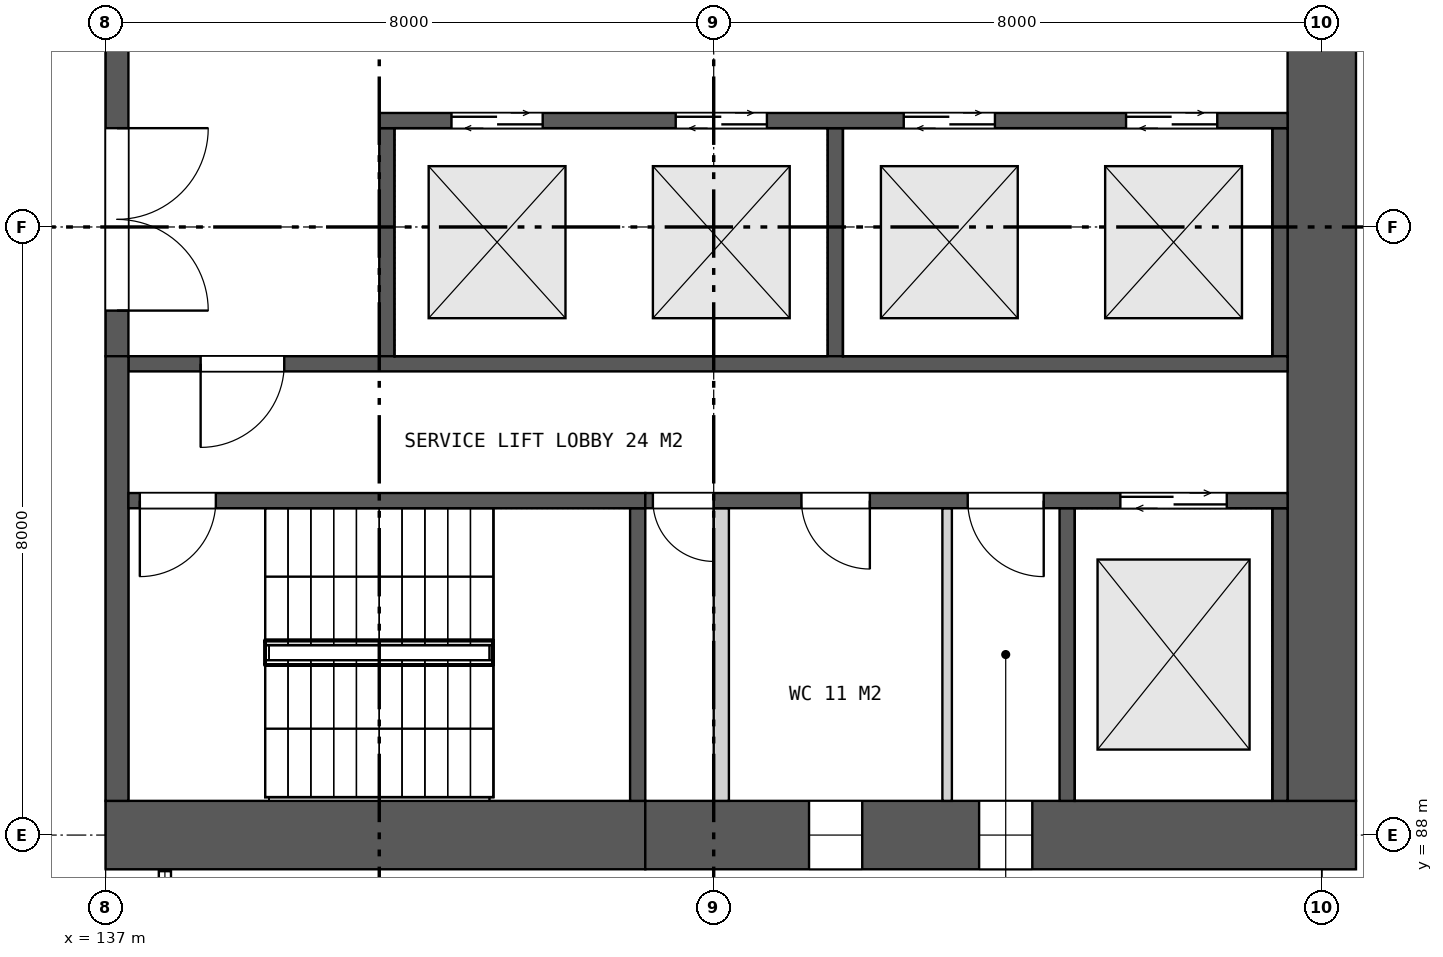
"""IFC4 building model, lengths in metres.
Left out: names, types, materials, properties, quantities, classifications, styles, units other than length and angle.
Written with IfcOpenShell. Run it as: python <this file> out.ifc"""

import sys

from ifc_helpers import new_model, si_unit, direction, frame, frame_2d, origin, place, context, subcontext, project, spatial, rectangle, extrude, element, fill, save


model = new_model("IFC4")
c1 = context("Model", 3, precision=1e-05, world=origin(), true_north=direction((0.0, 1.0)))
c2 = subcontext(c1, "Body", "Model", "MODEL_VIEW")
j1 = project(units=[si_unit("LENGTHUNIT", "METRE"), si_unit("PLANEANGLEUNIT", "RADIAN")], contexts=[c1])
p1 = place(None, origin())
s1 = spatial("IfcSite", under=j1, at=p1, CompositionType="ELEMENT")
p2 = place(p1, origin())
s2 = spatial("IfcBuilding", under=s1, at=p2, CompositionType="ELEMENT")
p3 = place(p2, frame((0.0, 0.0, 25.0)))
s3 = spatial("IfcBuildingStorey", under=s2, at=p3, CompositionType="ELEMENT", Elevation=25.0)
p4 = place(p3, frame((137.0, 88.0, 0.0), z_axis=(0.0, 0.0, 1.0), x_axis=(1.0, 0.0, 0.0)))
e1 = element("IfcWall", 1, at=p4, inside=s3, PredefinedType="SHEAR", context=c2, shape_type="SweptSolid", body=[
    extrude(rectangle(XDim=7.1, YDim=0.9, at=frame_2d((3.55, 0.0))), origin(), (0.0, 0.0, 1.0), 9.0),
])
p5 = place(p3, frame((144.1, 88.0, 0.0), z_axis=(0.0, 0.0, 1.0), x_axis=(1.0, 0.0, 0.0)))
e2 = element("IfcWall", 2, at=p5, inside=s3, PredefinedType="SHEAR", context=c2, shape_type="SweptSolid", body=[
    extrude(rectangle(XDim=9.35, YDim=0.9, at=frame_2d((4.675, 0.0))), origin(), (0.0, 0.0, 1.0), 9.0),
])
p6 = place(p5, frame((2.154, 0.0, 1.5)))
e3 = element("IfcOpeningElement", 3, at=p6, cuts=e2, PredefinedType="OPENING", context=c2, shape_type="SweptSolid", body=[
    extrude(rectangle(XDim=0.7, YDim=0.9, at=frame_2d((0.35, 0.45))), frame((0.0, 0.46, 0.0), z_axis=(0.0, -1.0, 0.0), x_axis=(1.0, 0.0, 0.0)), (0.0, 0.0, 1.0), 0.92),
])
p7 = place(p5, frame((4.392, 0.0, 1.5)))
e4 = element("IfcOpeningElement", 4, at=p7, cuts=e2, PredefinedType="OPENING", context=c2, shape_type="SweptSolid", body=[
    extrude(rectangle(XDim=0.7, YDim=0.9, at=frame_2d((0.35, 0.45))), frame((0.0, 0.46, 0.0), z_axis=(0.0, -1.0, 0.0), x_axis=(1.0, 0.0, 0.0)), (0.0, 0.0, 1.0), 0.92),
])
p8 = place(p3, frame((153.0, 88.45, 0.0), z_axis=(0.0, 0.0, 1.0), x_axis=(0.0, 1.0, 0.0)))
e5 = element("IfcWall", 5, at=p8, inside=s3, PredefinedType="SHEAR", context=c2, shape_type="SweptSolid", body=[
    extrude(rectangle(XDim=23.1, YDim=0.9, at=frame_2d((11.55, 0.0))), origin(), (0.0, 0.0, 1.0), 9.0),
])
p9 = place(p8, frame((10.35, 0.0, 0.0)))
e6 = element("IfcOpeningElement", 6, at=p9, cuts=e5, PredefinedType="OPENING", context=c2, shape_type="SweptSolid", body=[
    extrude(rectangle(XDim=2.4, YDim=2.4, at=frame_2d((1.2, 1.2))), frame((0.0, 0.46, 0.0), z_axis=(0.0, -1.0, 0.0), x_axis=(1.0, 0.0, 0.0)), (0.0, 0.0, 1.0), 0.92),
])
p10 = place(p3, frame((137.15, 94.3, 0.0), z_axis=(0.0, 0.0, 1.0), x_axis=(0.0, 1.0, 0.0)))
e7 = element("IfcWall", 7, at=p10, inside=s3, PredefinedType="SHEAR", context=c2, shape_type="SweptSolid", body=[
    extrude(rectangle(XDim=11.4, YDim=0.3, at=frame_2d((5.7, 0.0))), origin(), (0.0, 0.0, 1.0), 9.0),
])
p11 = place(p10, frame((0.6, 0.0, 0.0)))
e8 = element("IfcOpeningElement", 8, at=p11, cuts=e7, PredefinedType="OPENING", context=c2, shape_type="SweptSolid", body=[
    extrude(rectangle(XDim=2.4, YDim=2.4, at=frame_2d((1.2, 1.2))), frame((0.0, 0.16, 0.0), z_axis=(0.0, -1.0, 0.0), x_axis=(1.0, 0.0, 0.0)), (0.0, 0.0, 1.0), 0.32),
])
p12 = place(p10, frame((4.5, 0.0, 0.0)))
e9 = element("IfcOpeningElement", 9, at=p12, cuts=e7, PredefinedType="OPENING", context=c2, shape_type="SweptSolid", body=[
    extrude(rectangle(XDim=2.4, YDim=2.4, at=frame_2d((1.2, 1.2))), frame((0.0, 0.16, 0.0), z_axis=(0.0, -1.0, 0.0), x_axis=(1.0, 0.0, 0.0)), (0.0, 0.0, 1.0), 0.32),
])
p13 = place(p10, frame((8.4, 0.0, 0.0)))
e10 = element("IfcOpeningElement", 10, at=p13, cuts=e7, PredefinedType="OPENING", context=c2, shape_type="SweptSolid", body=[
    extrude(rectangle(XDim=2.4, YDim=2.4, at=frame_2d((1.2, 1.2))), frame((0.0, 0.16, 0.0), z_axis=(0.0, -1.0, 0.0), x_axis=(1.0, 0.0, 0.0)), (0.0, 0.0, 1.0), 0.32),
])
for number, where, z_axis, x_axis in (
    (11, (140.7, 94.3, 0.0), (0.0, 0.0, 1.0), (0.0, 1.0, 0.0)),
    (12, (146.6, 94.3, 0.0), (0.0, 0.0, 1.0), (0.0, 1.0, 0.0)),
    (13, (152.45, 94.3, 0.0), (0.0, 0.0, 1.0), (0.0, 1.0, 0.0)),
):
    element("IfcWall", number, at=place(p3, frame(where, z_axis=z_axis, x_axis=x_axis)), inside=s3, PredefinedType="SHEAR", context=c2, shape_type="SweptSolid", body=[
        extrude(rectangle(XDim=3.0, YDim=0.2, at=frame_2d((1.5, 0.0))), origin(), (0.0, 0.0, 1.0), 9.0),
    ])
p14 = place(p3, frame((140.6, 97.4, 0.0), z_axis=(0.0, 0.0, 1.0), x_axis=(1.0, 0.0, 0.0)))
e14 = element("IfcWall", 14, at=p14, inside=s3, PredefinedType="SHEAR", context=c2, shape_type="SweptSolid", body=[
    extrude(rectangle(XDim=11.95, YDim=0.2, at=frame_2d((5.975, 0.0))), origin(), (0.0, 0.0, 1.0), 9.0),
])
p15 = place(p14, frame((0.95, 0.0, 0.0)))
e15 = element("IfcOpeningElement", 15, at=p15, cuts=e14, PredefinedType="OPENING", context=c2, shape_type="SweptSolid", body=[
    extrude(rectangle(XDim=1.2, YDim=2.1, at=frame_2d((0.6, 1.05))), frame((0.0, 0.11, 0.0), z_axis=(0.0, -1.0, 0.0), x_axis=(1.0, 0.0, 0.0)), (0.0, 0.0, 1.0), 0.22),
])
p16 = place(p14, frame((3.9, 0.0, 0.0)))
e16 = element("IfcOpeningElement", 16, at=p16, cuts=e14, PredefinedType="OPENING", context=c2, shape_type="SweptSolid", body=[
    extrude(rectangle(XDim=1.2, YDim=2.1, at=frame_2d((0.6, 1.05))), frame((0.0, 0.11, 0.0), z_axis=(0.0, -1.0, 0.0), x_axis=(1.0, 0.0, 0.0)), (0.0, 0.0, 1.0), 0.22),
])
p17 = place(p14, frame((6.9, 0.0, 0.0)))
e17 = element("IfcOpeningElement", 17, at=p17, cuts=e14, PredefinedType="OPENING", context=c2, shape_type="SweptSolid", body=[
    extrude(rectangle(XDim=1.2, YDim=2.1, at=frame_2d((0.6, 1.05))), frame((0.0, 0.11, 0.0), z_axis=(0.0, -1.0, 0.0), x_axis=(1.0, 0.0, 0.0)), (0.0, 0.0, 1.0), 0.22),
])
p18 = place(p14, frame((9.825, 0.0, 0.0)))
e18 = element("IfcOpeningElement", 18, at=p18, cuts=e14, PredefinedType="OPENING", context=c2, shape_type="SweptSolid", body=[
    extrude(rectangle(XDim=1.2, YDim=2.1, at=frame_2d((0.6, 1.05))), frame((0.0, 0.11, 0.0), z_axis=(0.0, -1.0, 0.0), x_axis=(1.0, 0.0, 0.0)), (0.0, 0.0, 1.0), 0.22),
])
p19 = place(p3, frame((137.3, 94.2, 0.0), z_axis=(0.0, 0.0, 1.0), x_axis=(1.0, 0.0, 0.0)))
e19 = element("IfcWall", 19, at=p19, inside=s3, PredefinedType="SHEAR", context=c2, shape_type="SweptSolid", body=[
    extrude(rectangle(XDim=15.25, YDim=0.2, at=frame_2d((7.625, 0.0))), origin(), (0.0, 0.0, 1.0), 9.0),
])
p20 = place(p19, frame((0.95, 0.0, 0.0)))
e20 = element("IfcOpeningElement", 20, at=p20, cuts=e19, PredefinedType="OPENING", context=c2, shape_type="SweptSolid", body=[
    extrude(rectangle(XDim=1.1, YDim=2.1, at=frame_2d((0.55, 1.05))), frame((0.0, 0.11, 0.0), z_axis=(0.0, -1.0, 0.0), x_axis=(1.0, 0.0, 0.0)), (0.0, 0.0, 1.0), 0.22),
])
p21 = place(p3, frame((137.15, 88.45, 0.0), z_axis=(0.0, 0.0, 1.0), x_axis=(0.0, 1.0, 0.0)))
e21 = element("IfcWall", 21, at=p21, inside=s3, PredefinedType="SHEAR", context=c2, shape_type="SweptSolid", body=[
    extrude(rectangle(XDim=5.85, YDim=0.3, at=frame_2d((2.925, 0.0))), origin(), (0.0, 0.0, 1.0), 9.0),
])
for number, where, z_axis, x_axis in (
    (22, (144.0, 88.45, 0.0), (0.0, 0.0, 1.0), (0.0, 1.0, 0.0)),
    (23, (149.65, 88.45, 0.0), (0.0, 0.0, 1.0), (0.0, 1.0, 0.0)),
    (24, (152.45, 88.45, 0.0), (0.0, 0.0, 1.0), (0.0, 1.0, 0.0)),
):
    element("IfcWall", number, at=place(p3, frame(where, z_axis=z_axis, x_axis=x_axis)), inside=s3, PredefinedType="SHEAR", context=c2, shape_type="SweptSolid", body=[
        extrude(rectangle(XDim=3.85, YDim=0.2, at=frame_2d((1.925, 0.0))), origin(), (0.0, 0.0, 1.0), 9.0),
    ])
p22 = place(p3, frame((145.1, 88.45, 0.0), z_axis=(0.0, 0.0, 1.0), x_axis=(0.0, 1.0, 0.0)))
e25 = element("IfcWall", 25, at=p22, inside=s3, PredefinedType="PARTITIONING", context=c2, shape_type="SweptSolid", body=[
    extrude(rectangle(XDim=3.85, YDim=0.2, at=frame_2d((1.925, 0.0))), origin(), (0.0, 0.0, 1.0), 9.0),
])
p23 = place(p3, frame((148.071, 88.45, 0.0), z_axis=(0.0, 0.0, 1.0), x_axis=(0.0, 1.0, 0.0)))
e26 = element("IfcWall", 26, at=p23, inside=s3, PredefinedType="PARTITIONING", context=c2, shape_type="SweptSolid", body=[
    extrude(rectangle(XDim=3.85, YDim=0.125, at=frame_2d((1.925, 0.0))), origin(), (0.0, 0.0, 1.0), 9.0),
])
p24 = place(p3, frame((137.3, 92.4, 0.0), z_axis=(0.0, 0.0, 1.0), x_axis=(1.0, 0.0, 0.0)))
e27 = element("IfcWall", 27, at=p24, inside=s3, PredefinedType="SHEAR", context=c2, shape_type="SweptSolid", body=[
    extrude(rectangle(XDim=6.8, YDim=0.2, at=frame_2d((3.4, 0.0))), origin(), (0.0, 0.0, 1.0), 9.0),
])
p25 = place(p24, frame((0.15, 0.0, 0.0)))
e28 = element("IfcOpeningElement", 28, at=p25, cuts=e27, PredefinedType="OPENING", context=c2, shape_type="SweptSolid", body=[
    extrude(rectangle(XDim=1.0, YDim=2.1, at=frame_2d((0.5, 1.05))), frame((0.0, 0.11, 0.0), z_axis=(0.0, -1.0, 0.0), x_axis=(1.0, 0.0, 0.0)), (0.0, 0.0, 1.0), 0.22),
])
p26 = place(p3, frame((144.1, 92.4, 0.0), z_axis=(0.0, 0.0, 1.0), x_axis=(1.0, 0.0, 0.0)))
e29 = element("IfcWall", 29, at=p26, inside=s3, PredefinedType="SHEAR", context=c2, shape_type="SweptSolid", body=[
    extrude(rectangle(XDim=8.45, YDim=0.2, at=frame_2d((4.225, 0.0))), origin(), (0.0, 0.0, 1.0), 9.0),
])
p27 = place(p26, frame((0.1, 0.0, 0.0)))
e30 = element("IfcOpeningElement", 30, at=p27, cuts=e29, PredefinedType="OPENING", context=c2, shape_type="SweptSolid", body=[
    extrude(rectangle(XDim=0.8, YDim=2.1, at=frame_2d((0.4, 1.05))), frame((0.0, 0.11, 0.0), z_axis=(0.0, -1.0, 0.0), x_axis=(1.0, 0.0, 0.0)), (0.0, 0.0, 1.0), 0.22),
])
p28 = place(p26, frame((2.054, 0.0, 0.0)))
e31 = element("IfcOpeningElement", 31, at=p28, cuts=e29, PredefinedType="OPENING", context=c2, shape_type="SweptSolid", body=[
    extrude(rectangle(XDim=0.9, YDim=2.1, at=frame_2d((0.45, 1.05))), frame((0.0, 0.11, 0.0), z_axis=(0.0, -1.0, 0.0), x_axis=(1.0, 0.0, 0.0)), (0.0, 0.0, 1.0), 0.22),
])
p29 = place(p26, frame((4.242, 0.0, 0.0)))
e32 = element("IfcOpeningElement", 32, at=p29, cuts=e29, PredefinedType="OPENING", context=c2, shape_type="SweptSolid", body=[
    extrude(rectangle(XDim=1.0, YDim=2.1, at=frame_2d((0.5, 1.05))), frame((0.0, 0.11, 0.0), z_axis=(0.0, -1.0, 0.0), x_axis=(1.0, 0.0, 0.0)), (0.0, 0.0, 1.0), 0.22),
])
p30 = place(p26, frame((6.25, 0.0, 0.0)))
e33 = element("IfcOpeningElement", 33, at=p30, cuts=e29, PredefinedType="OPENING", context=c2, shape_type="SweptSolid", body=[
    extrude(rectangle(XDim=1.4, YDim=2.1, at=frame_2d((0.7, 1.05))), frame((0.0, 0.11, 0.0), z_axis=(0.0, -1.0, 0.0), x_axis=(1.0, 0.0, 0.0)), (0.0, 0.0, 1.0), 0.22),
])
p31 = place(p6, origin())
e34 = element("IfcWindow", 34, at=p31, inside=s3, PartitioningType="SINGLE_PANEL", PredefinedType="WINDOW", context=c2, shape_type="SweptSolid", body=[
    extrude(rectangle(XDim=0.7, YDim=0.9, at=frame_2d((0.35, 0.45))), frame((0.0, 0.03, 0.0), z_axis=(0.0, -1.0, 0.0), x_axis=(1.0, 0.0, 0.0)), (0.0, 0.0, 1.0), 0.06),
])
fill(e3, e34)
p32 = place(p7, origin())
e35 = element("IfcWindow", 35, at=p32, inside=s3, PartitioningType="SINGLE_PANEL", PredefinedType="WINDOW", context=c2, shape_type="SweptSolid", body=[
    extrude(rectangle(XDim=0.7, YDim=0.9, at=frame_2d((0.35, 0.45))), frame((0.0, 0.03, 0.0), z_axis=(0.0, -1.0, 0.0), x_axis=(1.0, 0.0, 0.0)), (0.0, 0.0, 1.0), 0.06),
])
fill(e4, e35)
p33 = place(p11, frame((2.4, 0.0, 0.0), z_axis=(0.0, 0.0, 1.0), x_axis=(-1.0, 0.0, 0.0)))
e36 = element("IfcDoor", 36, at=p33, inside=s3, OperationType="DOUBLE_DOOR_SINGLE_SWING", PredefinedType="DOOR", context=c2, shape_type="SweptSolid", body=[
    extrude(rectangle(XDim=2.4, YDim=2.4, at=frame_2d((1.2, 1.2))), frame((0.0, 0.025, 0.0), z_axis=(0.0, -1.0, 0.0), x_axis=(1.0, 0.0, 0.0)), (0.0, 0.0, 1.0), 0.05),
])
fill(e8, e36)
p34 = place(p15, origin())
e37 = element("IfcDoor", 37, at=p34, inside=s3, OperationType="DOUBLE_DOOR_SLIDING", PredefinedType="DOOR", context=c2, shape_type="SweptSolid", body=[
    extrude(rectangle(XDim=1.2, YDim=2.1, at=frame_2d((0.6, 1.05))), frame((0.0, 0.025, 0.0), z_axis=(0.0, -1.0, 0.0), x_axis=(1.0, 0.0, 0.0)), (0.0, 0.0, 1.0), 0.05),
])
fill(e15, e37)
p35 = place(p16, origin())
e38 = element("IfcDoor", 38, at=p35, inside=s3, OperationType="DOUBLE_DOOR_SLIDING", PredefinedType="DOOR", context=c2, shape_type="SweptSolid", body=[
    extrude(rectangle(XDim=1.2, YDim=2.1, at=frame_2d((0.6, 1.05))), frame((0.0, 0.025, 0.0), z_axis=(0.0, -1.0, 0.0), x_axis=(1.0, 0.0, 0.0)), (0.0, 0.0, 1.0), 0.05),
])
fill(e16, e38)
p36 = place(p17, origin())
e39 = element("IfcDoor", 39, at=p36, inside=s3, OperationType="DOUBLE_DOOR_SLIDING", PredefinedType="DOOR", context=c2, shape_type="SweptSolid", body=[
    extrude(rectangle(XDim=1.2, YDim=2.1, at=frame_2d((0.6, 1.05))), frame((0.0, 0.025, 0.0), z_axis=(0.0, -1.0, 0.0), x_axis=(1.0, 0.0, 0.0)), (0.0, 0.0, 1.0), 0.05),
])
fill(e17, e39)
p37 = place(p18, origin())
e40 = element("IfcDoor", 40, at=p37, inside=s3, OperationType="DOUBLE_DOOR_SLIDING", PredefinedType="DOOR", context=c2, shape_type="SweptSolid", body=[
    extrude(rectangle(XDim=1.2, YDim=2.1, at=frame_2d((0.6, 1.05))), frame((0.0, 0.025, 0.0), z_axis=(0.0, -1.0, 0.0), x_axis=(1.0, 0.0, 0.0)), (0.0, 0.0, 1.0), 0.05),
])
fill(e18, e40)
p38 = place(p20, frame((1.1, 0.0, 0.0), z_axis=(0.0, 0.0, 1.0), x_axis=(-1.0, 0.0, 0.0)))
e41 = element("IfcDoor", 41, at=p38, inside=s3, OperationType="SINGLE_SWING_RIGHT", PredefinedType="DOOR", context=c2, shape_type="SweptSolid", body=[
    extrude(rectangle(XDim=1.1, YDim=2.1, at=frame_2d((0.55, 1.05))), frame((0.0, 0.025, 0.0), z_axis=(0.0, -1.0, 0.0), x_axis=(1.0, 0.0, 0.0)), (0.0, 0.0, 1.0), 0.05),
])
fill(e20, e41)
p39 = place(p25, frame((1.0, 0.0, 0.0), z_axis=(0.0, 0.0, 1.0), x_axis=(-1.0, 0.0, 0.0)))
e42 = element("IfcDoor", 42, at=p39, inside=s3, OperationType="SINGLE_SWING_RIGHT", PredefinedType="DOOR", context=c2, shape_type="SweptSolid", body=[
    extrude(rectangle(XDim=1.0, YDim=2.1, at=frame_2d((0.5, 1.05))), frame((0.0, 0.025, 0.0), z_axis=(0.0, -1.0, 0.0), x_axis=(1.0, 0.0, 0.0)), (0.0, 0.0, 1.0), 0.05),
])
fill(e28, e42)
p40 = place(p27, frame((0.8, 0.0, 0.0), z_axis=(0.0, 0.0, 1.0), x_axis=(-1.0, 0.0, 0.0)))
e43 = element("IfcDoor", 43, at=p40, inside=s3, OperationType="SINGLE_SWING_LEFT", PredefinedType="DOOR", context=c2, shape_type="SweptSolid", body=[
    extrude(rectangle(XDim=0.8, YDim=2.1, at=frame_2d((0.4, 1.05))), frame((0.0, 0.025, 0.0), z_axis=(0.0, -1.0, 0.0), x_axis=(1.0, 0.0, 0.0)), (0.0, 0.0, 1.0), 0.05),
])
fill(e30, e43)
p41 = place(p28, frame((0.9, 0.0, 0.0), z_axis=(0.0, 0.0, 1.0), x_axis=(-1.0, 0.0, 0.0)))
e44 = element("IfcDoor", 44, at=p41, inside=s3, OperationType="SINGLE_SWING_LEFT", PredefinedType="DOOR", context=c2, shape_type="SweptSolid", body=[
    extrude(rectangle(XDim=0.9, YDim=2.1, at=frame_2d((0.45, 1.05))), frame((0.0, 0.025, 0.0), z_axis=(0.0, -1.0, 0.0), x_axis=(1.0, 0.0, 0.0)), (0.0, 0.0, 1.0), 0.05),
])
fill(e31, e44)
p42 = place(p29, frame((1.0, 0.0, 0.0), z_axis=(0.0, 0.0, 1.0), x_axis=(-1.0, 0.0, 0.0)))
e45 = element("IfcDoor", 45, at=p42, inside=s3, OperationType="SINGLE_SWING_LEFT", PredefinedType="DOOR", context=c2, shape_type="SweptSolid", body=[
    extrude(rectangle(XDim=1.0, YDim=2.1, at=frame_2d((0.5, 1.05))), frame((0.0, 0.025, 0.0), z_axis=(0.0, -1.0, 0.0), x_axis=(1.0, 0.0, 0.0)), (0.0, 0.0, 1.0), 0.05),
])
fill(e32, e45)
p43 = place(p30, origin())
e46 = element("IfcDoor", 46, at=p43, inside=s3, OperationType="DOUBLE_DOOR_SLIDING", PredefinedType="DOOR", context=c2, shape_type="SweptSolid", body=[
    extrude(rectangle(XDim=1.4, YDim=2.1, at=frame_2d((0.7, 1.05))), frame((0.0, 0.025, 0.0), z_axis=(0.0, -1.0, 0.0), x_axis=(1.0, 0.0, 0.0)), (0.0, 0.0, 1.0), 0.05),
])
fill(e33, e46)
save(model, sys.argv[1])
